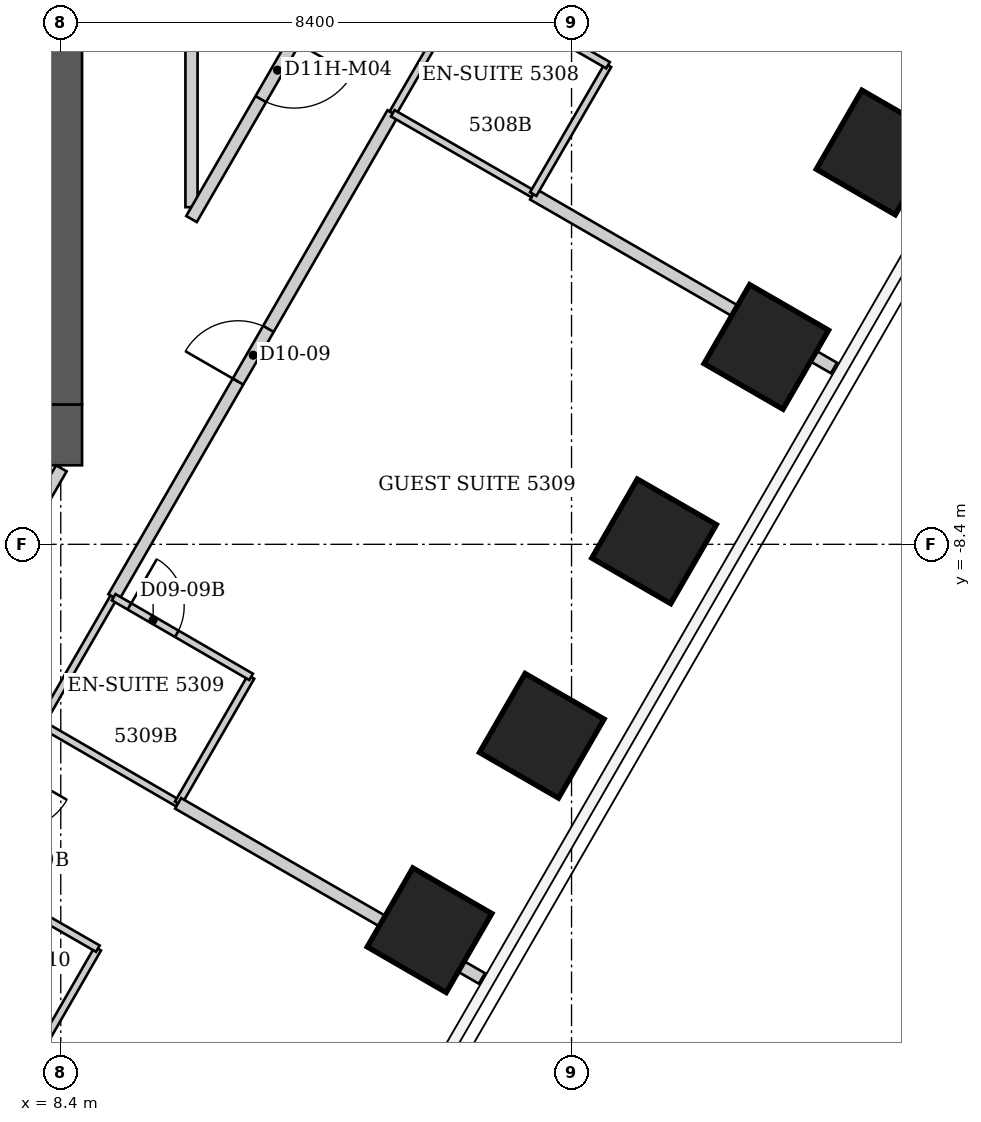
"""IFC4 building model, lengths in metres.
Left out: names, types, materials, properties, quantities, classifications, styles, units other than length and angle.
Written with IfcOpenShell. Run it as: python <this file> out.ifc"""

import sys

from ifc_helpers import new_model, si_unit, direction, frame, frame_2d, origin, origin_2d, place, context, subcontext, project, spatial, rectangle, extrude, element, fill, save


model = new_model("IFC4")
c1 = context("Model", 3, precision=1e-05, world=origin(), true_north=direction((0.0, 1.0)))
c2 = subcontext(c1, "Body", "Model", "MODEL_VIEW")
j1 = project(units=[si_unit("LENGTHUNIT", "METRE"), si_unit("PLANEANGLEUNIT", "RADIAN")], contexts=[c1])
p1 = place(None, origin())
s1 = spatial("IfcSite", under=j1, at=p1, CompositionType="ELEMENT")
p2 = place(p1, origin())
s2 = spatial("IfcBuilding", under=s1, at=p2, CompositionType="ELEMENT")
p3 = place(p2, frame((0.0, 0.0, 213.6)))
s3 = spatial("IfcBuildingStorey", under=s2, at=p3, CompositionType="ELEMENT", Elevation=213.6)
for number, where, z_axis, x_axis in (
    (1, (21.85, -1.956, 0.0), (0.0, 0.0, 1.0), (0.866, -0.5, 0.0)),
    (2, (20.003, -5.153, 0.0), (0.0, 0.0, 1.0), (0.866, -0.5, 0.0)),
    (3, (18.157, -8.351, 0.0), (0.0, 0.0, 1.0), (0.866, -0.5, 0.0)),
    (4, (16.311, -11.549, 0.0), (0.0, 0.0, 1.0), (0.866, -0.5, 0.0)),
    (5, (14.465, -14.747, 0.0), (0.0, 0.0, 1.0), (0.866, -0.5, 0.0)),
):
    element("IfcColumn", number, at=place(p3, frame(where, z_axis=z_axis, x_axis=x_axis)), inside=s3, PredefinedType="COLUMN", context=c2, shape_type="SweptSolid", body=[
        extrude(rectangle(XDim=1.5, YDim=1.5, at=origin_2d()), origin(), (0.0, 0.0, 1.0), 3.8),
    ])
p4 = place(p3, frame((-8.75, -6.6, 0.0), z_axis=(0.0, 0.0, 1.0), x_axis=(1.0, 0.0, 0.0)))
e6 = element("IfcWall", 6, at=p4, inside=s3, PredefinedType="SHEAR", context=c2, shape_type="SweptSolid", body=[
    extrude(rectangle(XDim=17.5, YDim=1.0, at=frame_2d((8.75, 0.0))), origin(), (0.0, 0.0, 1.0), 3.8),
])
p5 = place(p3, frame((8.25, -6.1, 0.0), z_axis=(0.0, 0.0, 1.0), x_axis=(0.0, 1.0, 0.0)))
e7 = element("IfcWall", 7, at=p5, inside=s3, PredefinedType="SHEAR", context=c2, shape_type="SweptSolid", body=[
    extrude(rectangle(XDim=12.2, YDim=1.0, at=frame_2d((6.1, 0.0))), origin(), (0.0, 0.0, 1.0), 3.8),
])
p6 = place(p5, frame((7.6, 0.0, 0.0)))
e8 = element("IfcOpeningElement", 8, at=p6, cuts=e7, PredefinedType="OPENING", context=c2, shape_type="SweptSolid", body=[
    extrude(rectangle(XDim=1.2, YDim=2.2, at=frame_2d((0.6, 1.1))), frame((0.0, 0.5, 0.0), z_axis=(0.0, -1.0, 0.0), x_axis=(1.0, 0.0, 0.0)), (0.0, 0.0, 1.0), 1.0),
])
p7 = place(p3, frame((5.515, -15.932, 0.0), z_axis=(0.0, 0.0, 1.0), x_axis=(0.327594697431, -0.944818349851, 0.0)))
e9 = element("IfcWall", 9, at=p7, inside=s3, PredefinedType="PARTITIONING", context=c2, shape_type="SweptSolid", body=[
    extrude(rectangle(XDim=10.668, YDim=0.2, at=frame_2d((5.334, 0.0))), origin(), (0.0, 0.0, 1.0), 3.64),
])
p8 = place(p3, frame((7.76, -17.22, 0.0), z_axis=(0.0, 0.0, 1.0), x_axis=(0.499159685399, 0.866510016372, 0.0)))
e10 = element("IfcWall", 10, at=p8, inside=s3, PredefinedType="PARTITIONING", context=c2, shape_type="SweptSolid", body=[
    extrude(rectangle(XDim=2.504, YDim=0.12, at=frame_2d((1.252, 0.0))), origin(), (0.0, 0.0, 1.0), 3.64),
])
p9 = place(p3, frame((8.07, -11.35, 0.0), z_axis=(0.0, 0.0, 1.0), x_axis=(0.499693115345, 0.866202511239, 0.0)))
e11 = element("IfcWall", 11, at=p9, inside=s3, PredefinedType="PARTITIONING", context=c2, shape_type="SweptSolid", body=[
    extrude(rectangle(XDim=2.401, YDim=0.12, at=frame_2d((1.201, 0.0))), origin(), (0.0, 0.0, 1.0), 3.64),
])
p10 = place(p3, frame((8.07, -11.35, 0.0), z_axis=(0.0, 0.0, 1.0), x_axis=(0.865195830568, -0.501434118073, 0.0)))
e12 = element("IfcWall", 12, at=p10, inside=s3, PredefinedType="PARTITIONING", context=c2, shape_type="SweptSolid", body=[
    extrude(rectangle(XDim=2.612, YDim=0.12, at=frame_2d((1.306, 0.0))), origin(), (0.0, 0.0, 1.0), 3.64),
])
p11 = place(p3, frame((8.41, -7.15, 0.0), z_axis=(0.0, 0.0, 1.0), x_axis=(-0.499828628176, -0.866124322748, 0.0)))
e13 = element("IfcWall", 13, at=p11, inside=s3, PredefinedType="PARTITIONING", context=c2, shape_type="SweptSolid", body=[
    extrude(rectangle(XDim=10.484, YDim=0.2, at=frame_2d((5.242, 0.0))), origin(), (0.0, 0.0, 1.0), 3.64),
])
p12 = place(p11, frame((4.692, 0.0, 0.0)))
e14 = element("IfcOpeningElement", 14, at=p12, cuts=e13, PredefinedType="OPENING", context=c2, shape_type="SweptSolid", body=[
    extrude(rectangle(XDim=1.1, YDim=2.2, at=frame_2d((0.55, 1.1))), frame((0.0, 0.1, 0.0), z_axis=(0.0, -1.0, 0.0), x_axis=(1.0, 0.0, 0.0)), (0.0, 0.0, 1.0), 0.2),
])
p13 = place(p3, frame((9.01, -15.05, 0.0), z_axis=(0.0, 0.0, 1.0), x_axis=(-0.866615255992, 0.498976951453, 0.0)))
e15 = element("IfcWall", 15, at=p13, inside=s3, PredefinedType="PARTITIONING", context=c2, shape_type="SweptSolid", body=[
    extrude(rectangle(XDim=2.666, YDim=0.12, at=frame_2d((1.333, 0.0))), origin(), (0.0, 0.0, 1.0), 3.64),
])
p14 = place(p13, frame((1.466, 0.0, 0.0)))
e16 = element("IfcOpeningElement", 16, at=p14, cuts=e15, PredefinedType="OPENING", context=c2, shape_type="SweptSolid", body=[
    extrude(rectangle(XDim=0.9, YDim=2.03, at=frame_2d((0.45, 1.015))), frame((0.0, 0.06, 0.0), z_axis=(0.0, -1.0, 0.0), x_axis=(1.0, 0.0, 0.0)), (0.0, 0.0, 1.0), 0.12),
])
p15 = place(p3, frame((9.27, -9.27, 0.0), z_axis=(0.0, 0.0, 1.0), x_axis=(0.499543028754, 0.866289075554, 0.0)))
e17 = element("IfcWall", 17, at=p15, inside=s3, PredefinedType="PARTITIONING", context=c2, shape_type="SweptSolid", body=[
    extrude(rectangle(XDim=9.188, YDim=0.2, at=frame_2d((4.594, 0.0))), origin(), (0.0, 0.0, 1.0), 3.64),
])
p16 = place(p15, frame((4.094, 0.0, 0.0)))
e18 = element("IfcOpeningElement", 18, at=p16, cuts=e17, PredefinedType="OPENING", context=c2, shape_type="SweptSolid", body=[
    extrude(rectangle(XDim=1.0, YDim=2.13, at=frame_2d((0.5, 1.065))), frame((0.0, 0.1, 0.0), z_axis=(0.0, -1.0, 0.0), x_axis=(1.0, 0.0, 0.0)), (0.0, 0.0, 1.0), 0.2),
])
p17 = place(p3, frame((10.33, -12.66, 0.0), z_axis=(0.0, 0.0, 1.0), x_axis=(0.499737123639, 0.866177122335, 0.0)))
e19 = element("IfcWall", 19, at=p17, inside=s3, PredefinedType="PARTITIONING", context=c2, shape_type="SweptSolid", body=[
    extrude(rectangle(XDim=2.401, YDim=0.12, at=frame_2d((1.201, 0.0))), origin(), (0.0, 0.0, 1.0), 3.64),
])
p18 = place(p3, frame((10.33, -12.66, 0.0), z_axis=(0.0, 0.0, 1.0), x_axis=(0.866342721203, -0.499449986905, 0.0)))
e20 = element("IfcWall", 20, at=p18, inside=s3, PredefinedType="PARTITIONING", context=c2, shape_type="SweptSolid", body=[
    extrude(rectangle(XDim=5.767, YDim=0.2, at=frame_2d((2.883, 0.0))), origin(), (0.0, 0.0, 1.0), 3.64),
])
p19 = place(p3, frame((10.55, -2.855, 0.0), z_axis=(0.0, 0.0, 1.0), x_axis=(0.0, 1.0, 0.0)))
e21 = element("IfcWall", 21, at=p19, inside=s3, PredefinedType="PARTITIONING", context=c2, shape_type="SweptSolid", body=[
    extrude(rectangle(XDim=4.375, YDim=0.2, at=frame_2d((2.188, 0.0))), origin(), (0.0, 0.0, 1.0), 3.64),
])
p20 = place(p3, frame((11.53, -10.58, 0.0), z_axis=(0.0, 0.0, 1.0), x_axis=(-0.865155281359, 0.50150407689, 0.0)))
e22 = element("IfcWall", 22, at=p20, inside=s3, PredefinedType="PARTITIONING", context=c2, shape_type="SweptSolid", body=[
    extrude(rectangle(XDim=2.612, YDim=0.12, at=frame_2d((1.306, 0.0))), origin(), (0.0, 0.0, 1.0), 3.64),
])
p21 = place(p20, frame((1.412, 0.0, 0.0)))
e23 = element("IfcOpeningElement", 23, at=p21, cuts=e22, PredefinedType="OPENING", context=c2, shape_type="SweptSolid", body=[
    extrude(rectangle(XDim=0.9, YDim=2.03, at=frame_2d((0.45, 1.015))), frame((0.0, 0.06, 0.0), z_axis=(0.0, -1.0, 0.0), x_axis=(1.0, 0.0, 0.0)), (0.0, 0.0, 1.0), 0.12),
])
p22 = place(p3, frame((13.19, 1.52, 0.0), z_axis=(0.0, 0.0, 1.0), x_axis=(-0.500193590286, -0.865913605527, 0.0)))
e24 = element("IfcWall", 24, at=p22, inside=s3, PredefinedType="PARTITIONING", context=c2, shape_type="SweptSolid", body=[
    extrude(rectangle(XDim=5.278, YDim=0.2, at=frame_2d((2.639, 0.0))), origin(), (0.0, 0.0, 1.0), 3.64),
])
p23 = place(p22, frame((1.9, 0.0, 0.0)))
e25 = element("IfcOpeningElement", 25, at=p23, cuts=e24, PredefinedType="OPENING", context=c2, shape_type="SweptSolid", body=[
    extrude(rectangle(XDim=1.1, YDim=2.2, at=frame_2d((0.55, 1.1))), frame((0.0, 0.1, 0.0), z_axis=(0.0, -1.0, 0.0), x_axis=(1.0, 0.0, 0.0)), (0.0, 0.0, 1.0), 0.2),
])
p24 = place(p3, frame((13.86, -1.31, 0.0), z_axis=(0.0, 0.0, 1.0), x_axis=(0.501813488763, 0.864975850817, 0.0)))
e26 = element("IfcWall", 26, at=p24, inside=s3, PredefinedType="PARTITIONING", context=c2, shape_type="SweptSolid", body=[
    extrude(rectangle(XDim=2.451, YDim=0.12, at=frame_2d((1.226, 0.0))), origin(), (0.0, 0.0, 1.0), 3.64),
])
p25 = place(p3, frame((16.168, -2.643, 0.0), z_axis=(0.0, 0.0, 1.0), x_axis=(0.865980633471, -0.500077536441, 0.0)))
e27 = element("IfcWall", 27, at=p25, inside=s3, PredefinedType="PARTITIONING", context=c2, shape_type="SweptSolid", body=[
    extrude(rectangle(XDim=5.713, YDim=0.2, at=frame_2d((2.857, 0.0))), origin(), (0.0, 0.0, 1.0), 3.64),
])
p26 = place(p3, frame((16.17, -2.64, 0.0), z_axis=(0.0, 0.0, 1.0), x_axis=(-0.86663205897, 0.498947767172, 0.0)))
e28 = element("IfcWall", 28, at=p26, inside=s3, PredefinedType="PARTITIONING", context=c2, shape_type="SweptSolid", body=[
    extrude(rectangle(XDim=2.665, YDim=0.12, at=frame_2d((1.333, 0.0))), origin(), (0.0, 0.0, 1.0), 3.64),
])
p27 = place(p3, frame((16.17, -2.64, 0.0), z_axis=(0.0, 0.0, 1.0), x_axis=(0.501856726365, 0.86495076519, 0.0)))
e29 = element("IfcWall", 29, at=p27, inside=s3, PredefinedType="PARTITIONING", context=c2, shape_type="SweptSolid", body=[
    extrude(rectangle(XDim=2.451, YDim=0.12, at=frame_2d((1.226, 0.0))), origin(), (0.0, 0.0, 1.0), 3.64),
])
p28 = place(p3, frame((17.4, -0.52, 0.0), z_axis=(0.0, 0.0, 1.0), x_axis=(-0.866592449628, 0.499016559092, 0.0)))
e30 = element("IfcWall", 30, at=p28, inside=s3, PredefinedType="PARTITIONING", context=c2, shape_type="SweptSolid", body=[
    extrude(rectangle(XDim=2.665, YDim=0.12, at=frame_2d((1.333, 0.0))), origin(), (0.0, 0.0, 1.0), 3.64),
])
p29 = place(p28, frame((1.466, 0.0, 0.0)))
e31 = element("IfcOpeningElement", 31, at=p29, cuts=e30, PredefinedType="OPENING", context=c2, shape_type="SweptSolid", body=[
    extrude(rectangle(XDim=0.9, YDim=2.03, at=frame_2d((0.45, 1.015))), frame((0.0, 0.06, 0.0), z_axis=(0.0, -1.0, 0.0), x_axis=(1.0, 0.0, 0.0)), (0.0, 0.0, 1.0), 0.12),
])
p30 = place(p16, origin())
e32 = element("IfcDoor", 32, at=p30, inside=s3, OperationType="SINGLE_SWING_LEFT", PredefinedType="DOOR", context=c2, shape_type="SweptSolid", body=[
    extrude(rectangle(XDim=1.0, YDim=2.13, at=frame_2d((0.5, 1.065))), frame((0.0, 0.025, 0.0), z_axis=(0.0, -1.0, 0.0), x_axis=(1.0, 0.0, 0.0)), (0.0, 0.0, 1.0), 0.05),
])
fill(e18, e32)
p31 = place(p21, origin())
e33 = element("IfcDoor", 33, at=p31, inside=s3, OperationType="SINGLE_SWING_RIGHT", PredefinedType="DOOR", context=c2, shape_type="SweptSolid", body=[
    extrude(rectangle(XDim=0.9, YDim=2.03, at=frame_2d((0.45, 1.015))), frame((0.0, 0.025, 0.0), z_axis=(0.0, -1.0, 0.0), x_axis=(1.0, 0.0, 0.0)), (0.0, 0.0, 1.0), 0.05),
])
fill(e23, e33)
p32 = place(p23, origin())
e34 = element("IfcDoor", 34, at=p32, inside=s3, OperationType="SINGLE_SWING_LEFT", PredefinedType="DOOR", context=c2, shape_type="SweptSolid", body=[
    extrude(rectangle(XDim=1.1, YDim=2.2, at=frame_2d((0.55, 1.1))), frame((0.0, 0.025, 0.0), z_axis=(0.0, -1.0, 0.0), x_axis=(1.0, 0.0, 0.0)), (0.0, 0.0, 1.0), 0.05),
])
fill(e25, e34)
save(model, sys.argv[1])
